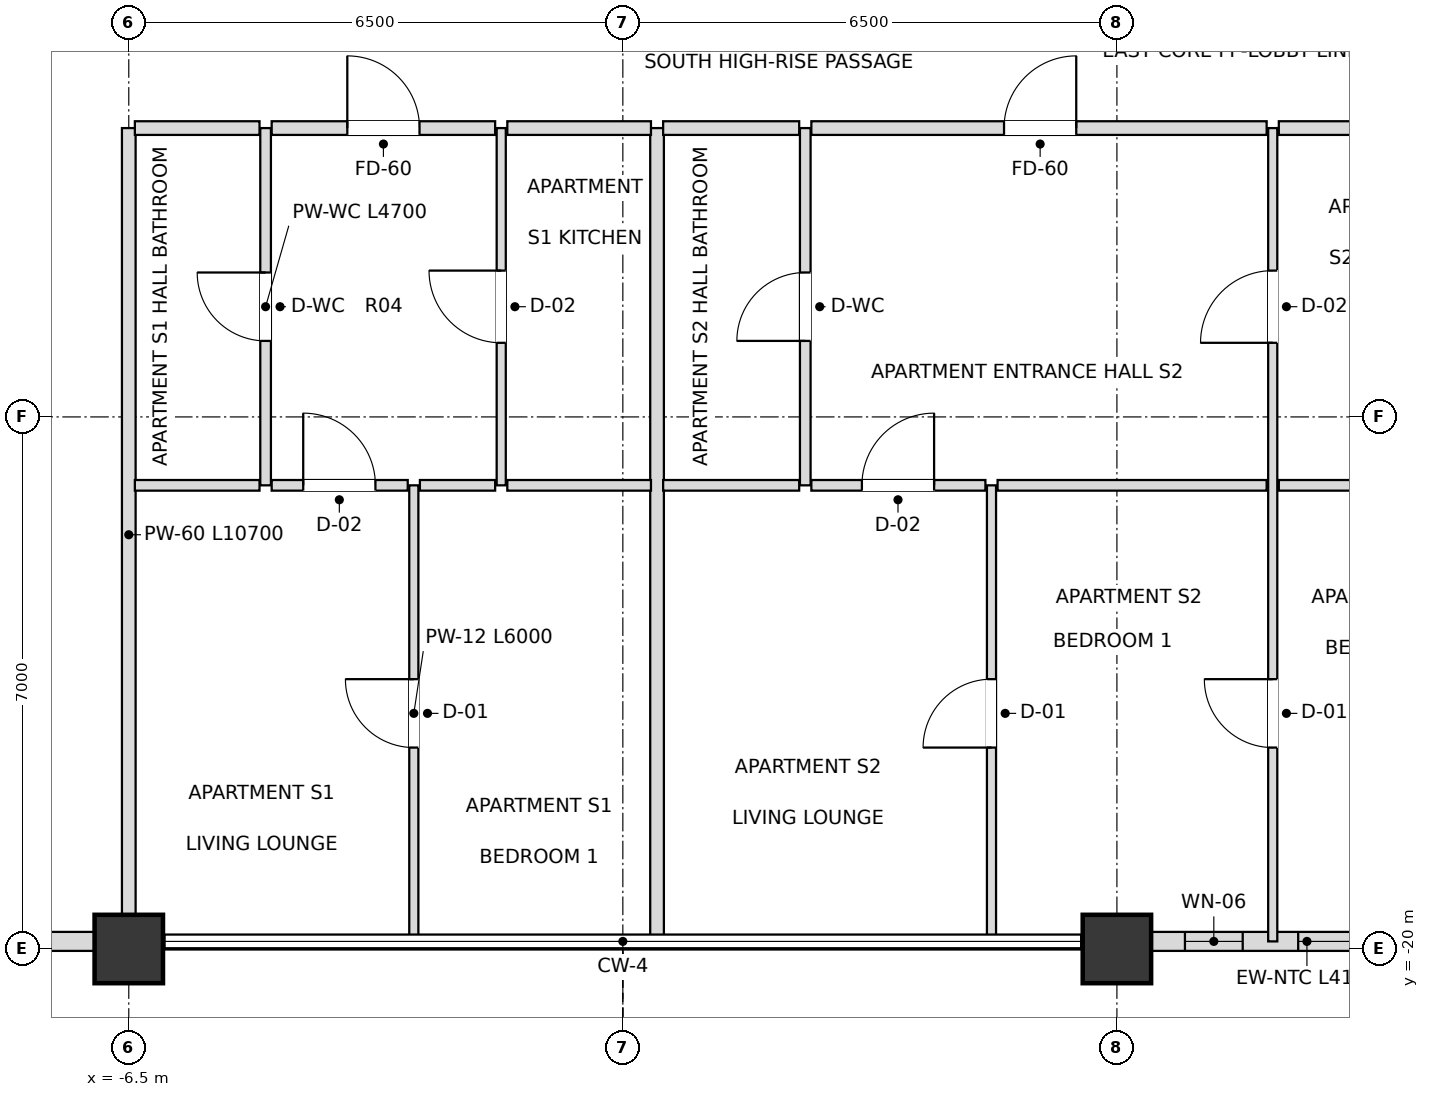
"""IFC4 building model, lengths in metres.
Left out: names, types, materials, properties, quantities, classifications, styles, units other than length and angle.
Written with IfcOpenShell. Run it as: python <this file> out.ifc"""

import sys

from ifc_helpers import new_model, si_unit, direction, frame, frame_2d, origin, origin_2d, place, context, subcontext, project, spatial, rectangle, extrude, element, fill, save


model = new_model("IFC4")
c1 = context("Model", 3, precision=1e-05, world=origin(), true_north=direction((0.0, 1.0)))
c2 = subcontext(c1, "Body", "Model", "MODEL_VIEW")
j1 = project(units=[si_unit("LENGTHUNIT", "METRE"), si_unit("PLANEANGLEUNIT", "RADIAN")], contexts=[c1])
p1 = place(None, origin())
s1 = spatial("IfcSite", under=j1, at=p1, CompositionType="ELEMENT")
p2 = place(p1, origin())
s2 = spatial("IfcBuilding", under=s1, at=p2, CompositionType="ELEMENT")
p3 = place(p2, frame((0.0, 0.0, 229.5)))
s3 = spatial("IfcBuildingStorey", under=s2, at=p3, CompositionType="ELEMENT", Elevation=229.5)
for number, where, z_axis, x_axis in (
    (1, (-6.5, -20.0, 0.0), (0.0, 0.0, 1.0), (1.0, 0.0, 0.0)),
    (2, (6.5, -20.0, 0.0), (0.0, 0.0, 1.0), (1.0, 0.0, 0.0)),
):
    element("IfcColumn", number, at=place(p3, frame(where, z_axis=z_axis, x_axis=x_axis)), inside=s3, PredefinedType="USERDEFINED", context=c2, shape_type="SweptSolid", body=[
        extrude(rectangle(XDim=0.9, YDim=0.9, at=origin_2d()), origin(), (0.0, 0.0, 1.0), 3.6),
    ])
p4 = place(p3, frame((-11.055, -19.9, 0.0), z_axis=(0.0, 0.0, 1.0), x_axis=(1.0, 0.0, 0.0)))
e3 = element("IfcWall", 3, at=p4, inside=s3, PredefinedType="SOLIDWALL", context=c2, shape_type="SweptSolid", body=[
    extrude(rectangle(XDim=4.11, YDim=0.25, at=frame_2d((2.055, 0.0))), origin(), (0.0, 0.0, 1.0), 2.748),
])
p5 = place(p4, frame((1.155, 0.0, 0.72)))
e4 = element("IfcOpeningElement", 4, at=p5, cuts=e3, PredefinedType="OPENING", context=c2, shape_type="SweptSolid", body=[
    extrude(rectangle(XDim=1.8, YDim=1.68, at=frame_2d((0.9, 0.84))), frame((0.0, 0.135, 0.0), z_axis=(0.0, -1.0, 0.0), x_axis=(1.0, 0.0, 0.0)), (0.0, 0.0, 1.0), 0.27),
])
p6 = place(p3, frame((6.945, -19.9, 0.0), z_axis=(0.0, 0.0, 1.0), x_axis=(1.0, 0.0, 0.0)))
e5 = element("IfcWall", 5, at=p6, inside=s3, PredefinedType="SOLIDWALL", context=c2, shape_type="SweptSolid", body=[
    extrude(rectangle(XDim=4.11, YDim=0.25, at=frame_2d((2.055, 0.0))), origin(), (0.0, 0.0, 1.0), 2.748),
])
p7 = place(p6, frame((0.45, 0.0, 0.72)))
e6 = element("IfcOpeningElement", 6, at=p7, cuts=e5, PredefinedType="OPENING", context=c2, shape_type="SweptSolid", body=[
    extrude(rectangle(XDim=0.76, YDim=1.68, at=frame_2d((0.38, 0.84))), frame((0.0, 0.135, 0.0), z_axis=(0.0, -1.0, 0.0), x_axis=(1.0, 0.0, 0.0)), (0.0, 0.0, 1.0), 0.27),
])
p8 = place(p6, frame((1.94, 0.0, 0.72)))
e7 = element("IfcOpeningElement", 7, at=p8, cuts=e5, PredefinedType="OPENING", context=c2, shape_type="SweptSolid", body=[
    extrude(rectangle(XDim=1.8, YDim=1.68, at=frame_2d((0.9, 0.84))), frame((0.0, 0.135, 0.0), z_axis=(0.0, -1.0, 0.0), x_axis=(1.0, 0.0, 0.0)), (0.0, 0.0, 1.0), 0.27),
])
p9 = place(p3, frame((-6.5, -19.9, 0.0), z_axis=(0.0, 0.0, 1.0), x_axis=(0.0, 1.0, 0.0)))
e8 = element("IfcWall", 8, at=p9, inside=s3, PredefinedType="PARTITIONING", context=c2, shape_type="SweptSolid", body=[
    extrude(rectangle(XDim=10.7, YDim=0.18, at=frame_2d((5.35, 0.0))), origin(), (0.0, 0.0, 1.0), 2.826),
])
p10 = place(p3, frame((-4.7, -13.9, 0.0), z_axis=(0.0, 0.0, 1.0), x_axis=(0.0, 1.0, 0.0)))
e9 = element("IfcWall", 9, at=p10, inside=s3, PredefinedType="PARTITIONING", context=c2, shape_type="SweptSolid", body=[
    extrude(rectangle(XDim=4.7, YDim=0.14, at=frame_2d((2.35, 0.0))), origin(), (0.0, 0.0, 1.0), 3.38),
])
p11 = place(p10, frame((1.9, 0.0, 0.0)))
e10 = element("IfcOpeningElement", 10, at=p11, cuts=e9, PredefinedType="OPENING", context=c2, shape_type="SweptSolid", body=[
    extrude(rectangle(XDim=0.9, YDim=2.1, at=frame_2d((0.45, 1.05))), frame((0.0, 0.08, 0.0), z_axis=(0.0, -1.0, 0.0), x_axis=(1.0, 0.0, 0.0)), (0.0, 0.0, 1.0), 0.16),
])
p12 = place(p3, frame((-2.75, -19.9, 0.0), z_axis=(0.0, 0.0, 1.0), x_axis=(0.0, 1.0, 0.0)))
e11 = element("IfcWall", 11, at=p12, inside=s3, PredefinedType="PARTITIONING", context=c2, shape_type="SweptSolid", body=[
    extrude(rectangle(XDim=6.0, YDim=0.12, at=frame_2d((3.0, 0.0))), origin(), (0.0, 0.0, 1.0), 3.018),
])
p13 = place(p12, frame((2.55, 0.0, 0.0)))
e12 = element("IfcOpeningElement", 12, at=p13, cuts=e11, PredefinedType="OPENING", context=c2, shape_type="SweptSolid", body=[
    extrude(rectangle(XDim=0.9, YDim=2.1, at=frame_2d((0.45, 1.05))), frame((0.0, 0.07, 0.0), z_axis=(0.0, -1.0, 0.0), x_axis=(1.0, 0.0, 0.0)), (0.0, 0.0, 1.0), 0.14),
])
p14 = place(p3, frame((-1.6, -13.9, 0.0), z_axis=(0.0, 0.0, 1.0), x_axis=(0.0, 1.0, 0.0)))
e13 = element("IfcWall", 13, at=p14, inside=s3, PredefinedType="PARTITIONING", context=c2, shape_type="SweptSolid", body=[
    extrude(rectangle(XDim=4.7, YDim=0.12, at=frame_2d((2.35, 0.0))), origin(), (0.0, 0.0, 1.0), 3.38),
])
p15 = place(p14, frame((1.875, 0.0, 0.0)))
e14 = element("IfcOpeningElement", 14, at=p15, cuts=e13, PredefinedType="OPENING", context=c2, shape_type="SweptSolid", body=[
    extrude(rectangle(XDim=0.95, YDim=2.1, at=frame_2d((0.475, 1.05))), frame((0.0, 0.07, 0.0), z_axis=(0.0, -1.0, 0.0), x_axis=(1.0, 0.0, 0.0)), (0.0, 0.0, 1.0), 0.14),
])
p16 = place(p3, frame((0.45, -19.9, 0.0), z_axis=(0.0, 0.0, 1.0), x_axis=(0.0, 1.0, 0.0)))
e15 = element("IfcWall", 15, at=p16, inside=s3, PredefinedType="PARTITIONING", context=c2, shape_type="SweptSolid", body=[
    extrude(rectangle(XDim=10.7, YDim=0.18, at=frame_2d((5.35, 0.0))), origin(), (0.0, 0.0, 1.0), 3.018),
])
p17 = place(p3, frame((2.4, -13.9, 0.0), z_axis=(0.0, 0.0, 1.0), x_axis=(0.0, 1.0, 0.0)))
e16 = element("IfcWall", 16, at=p17, inside=s3, PredefinedType="PARTITIONING", context=c2, shape_type="SweptSolid", body=[
    extrude(rectangle(XDim=4.7, YDim=0.14, at=frame_2d((2.35, 0.0))), origin(), (0.0, 0.0, 1.0), 3.38),
])
p18 = place(p17, frame((1.9, 0.0, 0.0)))
e17 = element("IfcOpeningElement", 17, at=p18, cuts=e16, PredefinedType="OPENING", context=c2, shape_type="SweptSolid", body=[
    extrude(rectangle(XDim=0.9, YDim=2.1, at=frame_2d((0.45, 1.05))), frame((0.0, 0.08, 0.0), z_axis=(0.0, -1.0, 0.0), x_axis=(1.0, 0.0, 0.0)), (0.0, 0.0, 1.0), 0.16),
])
p19 = place(p3, frame((4.85, -19.9, 0.0), z_axis=(0.0, 0.0, 1.0), x_axis=(0.0, 1.0, 0.0)))
e18 = element("IfcWall", 18, at=p19, inside=s3, PredefinedType="PARTITIONING", context=c2, shape_type="SweptSolid", body=[
    extrude(rectangle(XDim=6.0, YDim=0.12, at=frame_2d((3.0, 0.0))), origin(), (0.0, 0.0, 1.0), 3.018),
])
p20 = place(p19, frame((2.55, 0.0, 0.0)))
e19 = element("IfcOpeningElement", 19, at=p20, cuts=e18, PredefinedType="OPENING", context=c2, shape_type="SweptSolid", body=[
    extrude(rectangle(XDim=0.9, YDim=2.1, at=frame_2d((0.45, 1.05))), frame((0.0, 0.07, 0.0), z_axis=(0.0, -1.0, 0.0), x_axis=(1.0, 0.0, 0.0)), (0.0, 0.0, 1.0), 0.14),
])
p21 = place(p3, frame((8.55, -19.9, 0.0), z_axis=(0.0, 0.0, 1.0), x_axis=(0.0, 1.0, 0.0)))
e20 = element("IfcWall", 20, at=p21, inside=s3, PredefinedType="PARTITIONING", context=c2, shape_type="SweptSolid", body=[
    extrude(rectangle(XDim=10.7, YDim=0.12, at=frame_2d((5.35, 0.0))), origin(), (0.0, 0.0, 1.0), 2.826),
])
p22 = place(p21, frame((7.875, 0.0, 0.0)))
e21 = element("IfcOpeningElement", 21, at=p22, cuts=e20, PredefinedType="OPENING", context=c2, shape_type="SweptSolid", body=[
    extrude(rectangle(XDim=0.95, YDim=2.1, at=frame_2d((0.475, 1.05))), frame((0.0, 0.07, 0.0), z_axis=(0.0, -1.0, 0.0), x_axis=(1.0, 0.0, 0.0)), (0.0, 0.0, 1.0), 0.14),
])
p23 = place(p21, frame((2.55, 0.0, 0.0)))
e22 = element("IfcOpeningElement", 22, at=p23, cuts=e20, PredefinedType="OPENING", context=c2, shape_type="SweptSolid", body=[
    extrude(rectangle(XDim=0.9, YDim=2.1, at=frame_2d((0.45, 1.05))), frame((0.0, 0.07, 0.0), z_axis=(0.0, -1.0, 0.0), x_axis=(1.0, 0.0, 0.0)), (0.0, 0.0, 1.0), 0.14),
])
p24 = place(p3, frame((-6.42, -13.9, 0.0), z_axis=(0.0, 0.0, 1.0), x_axis=(1.0, 0.0, 0.0)))
e23 = element("IfcWall", 23, at=p24, inside=s3, PredefinedType="PARTITIONING", context=c2, shape_type="SweptSolid", body=[
    extrude(rectangle(XDim=1.64, YDim=0.14, at=frame_2d((0.82, 0.0))), origin(), (0.0, 0.0, 1.0), 3.38),
])
p25 = place(p3, frame((-4.62, -13.9, 0.0), z_axis=(0.0, 0.0, 1.0), x_axis=(1.0, 0.0, 0.0)))
e24 = element("IfcWall", 24, at=p25, inside=s3, PredefinedType="PARTITIONING", context=c2, shape_type="SweptSolid", body=[
    extrude(rectangle(XDim=1.79, YDim=0.14, at=frame_2d((0.895, 0.0))), origin(), (0.0, 0.0, 1.0), 3.38),
])
p26 = place(p25, frame((0.415, 0.0, 0.0)))
e25 = element("IfcOpeningElement", 25, at=p26, cuts=e24, PredefinedType="OPENING", context=c2, shape_type="SweptSolid", body=[
    extrude(rectangle(XDim=0.95, YDim=2.1, at=frame_2d((0.475, 1.05))), frame((0.0, 0.08, 0.0), z_axis=(0.0, -1.0, 0.0), x_axis=(1.0, 0.0, 0.0)), (0.0, 0.0, 1.0), 0.16),
])
p27 = place(p3, frame((-2.67, -13.9, 0.0), z_axis=(0.0, 0.0, 1.0), x_axis=(1.0, 0.0, 0.0)))
e26 = element("IfcWall", 26, at=p27, inside=s3, PredefinedType="PARTITIONING", context=c2, shape_type="SweptSolid", body=[
    extrude(rectangle(XDim=0.99, YDim=0.14, at=frame_2d((0.495, 0.0))), origin(), (0.0, 0.0, 1.0), 3.38),
])
p28 = place(p3, frame((-1.52, -13.9, 0.0), z_axis=(0.0, 0.0, 1.0), x_axis=(1.0, 0.0, 0.0)))
e27 = element("IfcWall", 27, at=p28, inside=s3, PredefinedType="PARTITIONING", context=c2, shape_type="SweptSolid", body=[
    extrude(rectangle(XDim=1.89, YDim=0.14, at=frame_2d((0.945, 0.0))), origin(), (0.0, 0.0, 1.0), 3.38),
])
p29 = place(p3, frame((0.53, -13.9, 0.0), z_axis=(0.0, 0.0, 1.0), x_axis=(1.0, 0.0, 0.0)))
e28 = element("IfcWall", 28, at=p29, inside=s3, PredefinedType="PARTITIONING", context=c2, shape_type="SweptSolid", body=[
    extrude(rectangle(XDim=1.79, YDim=0.14, at=frame_2d((0.895, 0.0))), origin(), (0.0, 0.0, 1.0), 3.38),
])
p30 = place(p3, frame((2.48, -13.9, 0.0), z_axis=(0.0, 0.0, 1.0), x_axis=(1.0, 0.0, 0.0)))
e29 = element("IfcWall", 29, at=p30, inside=s3, PredefinedType="PARTITIONING", context=c2, shape_type="SweptSolid", body=[
    extrude(rectangle(XDim=2.29, YDim=0.14, at=frame_2d((1.145, 0.0))), origin(), (0.0, 0.0, 1.0), 3.38),
])
p31 = place(p30, frame((0.665, 0.0, 0.0)))
e30 = element("IfcOpeningElement", 30, at=p31, cuts=e29, PredefinedType="OPENING", context=c2, shape_type="SweptSolid", body=[
    extrude(rectangle(XDim=0.95, YDim=2.1, at=frame_2d((0.475, 1.05))), frame((0.0, 0.08, 0.0), z_axis=(0.0, -1.0, 0.0), x_axis=(1.0, 0.0, 0.0)), (0.0, 0.0, 1.0), 0.16),
])
p32 = place(p3, frame((4.93, -13.9, 0.0), z_axis=(0.0, 0.0, 1.0), x_axis=(1.0, 0.0, 0.0)))
e31 = element("IfcWall", 31, at=p32, inside=s3, PredefinedType="PARTITIONING", context=c2, shape_type="SweptSolid", body=[
    extrude(rectangle(XDim=3.54, YDim=0.14, at=frame_2d((1.77, 0.0))), origin(), (0.0, 0.0, 1.0), 2.826),
])
p33 = place(p3, frame((8.63, -13.9, 0.0), z_axis=(0.0, 0.0, 1.0), x_axis=(1.0, 0.0, 0.0)))
e32 = element("IfcWall", 32, at=p33, inside=s3, PredefinedType="PARTITIONING", context=c2, shape_type="SweptSolid", body=[
    extrude(rectangle(XDim=2.69, YDim=0.14, at=frame_2d((1.345, 0.0))), origin(), (0.0, 0.0, 1.0), 3.38),
])
p34 = place(p3, frame((-6.42, -9.2, 0.0), z_axis=(0.0, 0.0, 1.0), x_axis=(1.0, 0.0, 0.0)))
e33 = element("IfcWall", 33, at=p34, inside=s3, PredefinedType="PARTITIONING", context=c2, shape_type="SweptSolid", body=[
    extrude(rectangle(XDim=1.64, YDim=0.18, at=frame_2d((0.82, 0.0))), origin(), (0.0, 0.0, 1.0), 3.38),
])
p35 = place(p3, frame((-4.62, -9.2, 0.0), z_axis=(0.0, 0.0, 1.0), x_axis=(1.0, 0.0, 0.0)))
e34 = element("IfcWall", 34, at=p35, inside=s3, PredefinedType="PARTITIONING", context=c2, shape_type="SweptSolid", body=[
    extrude(rectangle(XDim=2.94, YDim=0.18, at=frame_2d((1.47, 0.0))), origin(), (0.0, 0.0, 1.0), 3.38),
])
p36 = place(p35, frame((0.995, 0.0, 0.0)))
e35 = element("IfcOpeningElement", 35, at=p36, cuts=e34, PredefinedType="OPENING", context=c2, shape_type="SweptSolid", body=[
    extrude(rectangle(XDim=0.95, YDim=2.15, at=frame_2d((0.475, 1.075))), frame((0.0, 0.1, 0.0), z_axis=(0.0, -1.0, 0.0), x_axis=(1.0, 0.0, 0.0)), (0.0, 0.0, 1.0), 0.2),
])
p37 = place(p3, frame((-1.52, -9.2, 0.0), z_axis=(0.0, 0.0, 1.0), x_axis=(1.0, 0.0, 0.0)))
e36 = element("IfcWall", 36, at=p37, inside=s3, PredefinedType="PARTITIONING", context=c2, shape_type="SweptSolid", body=[
    extrude(rectangle(XDim=1.89, YDim=0.18, at=frame_2d((0.945, 0.0))), origin(), (0.0, 0.0, 1.0), 3.38),
])
p38 = place(p3, frame((0.53, -9.2, 0.0), z_axis=(0.0, 0.0, 1.0), x_axis=(1.0, 0.0, 0.0)))
e37 = element("IfcWall", 37, at=p38, inside=s3, PredefinedType="PARTITIONING", context=c2, shape_type="SweptSolid", body=[
    extrude(rectangle(XDim=1.79, YDim=0.18, at=frame_2d((0.895, 0.0))), origin(), (0.0, 0.0, 1.0), 3.38),
])
p39 = place(p3, frame((2.48, -9.2, 0.0), z_axis=(0.0, 0.0, 1.0), x_axis=(1.0, 0.0, 0.0)))
e38 = element("IfcWall", 38, at=p39, inside=s3, PredefinedType="PARTITIONING", context=c2, shape_type="SweptSolid", body=[
    extrude(rectangle(XDim=5.99, YDim=0.18, at=frame_2d((2.995, 0.0))), origin(), (0.0, 0.0, 1.0), 2.826),
])
p40 = place(p39, frame((2.535, 0.0, 0.0)))
e39 = element("IfcOpeningElement", 39, at=p40, cuts=e38, PredefinedType="OPENING", context=c2, shape_type="SweptSolid", body=[
    extrude(rectangle(XDim=0.95, YDim=2.15, at=frame_2d((0.475, 1.075))), frame((0.0, 0.1, 0.0), z_axis=(0.0, -1.0, 0.0), x_axis=(1.0, 0.0, 0.0)), (0.0, 0.0, 1.0), 0.2),
])
p41 = place(p3, frame((8.63, -9.2, 0.0), z_axis=(0.0, 0.0, 1.0), x_axis=(1.0, 0.0, 0.0)))
e40 = element("IfcWall", 40, at=p41, inside=s3, PredefinedType="PARTITIONING", context=c2, shape_type="SweptSolid", body=[
    extrude(rectangle(XDim=2.69, YDim=0.18, at=frame_2d((1.345, 0.0))), origin(), (0.0, 0.0, 1.0), 3.38),
])
p42 = place(p7, origin())
e41 = element("IfcWindow", 41, at=p42, inside=s3, PartitioningType="SINGLE_PANEL", PredefinedType="WINDOW", context=c2, shape_type="SweptSolid", body=[
    extrude(rectangle(XDim=0.76, YDim=1.68, at=frame_2d((0.38, 0.84))), frame((0.0, 0.03, 0.0), z_axis=(0.0, -1.0, 0.0), x_axis=(1.0, 0.0, 0.0)), (0.0, 0.0, 1.0), 0.06),
])
fill(e6, e41)
p43 = place(p8, origin())
e42 = element("IfcWindow", 42, at=p43, inside=s3, PartitioningType="SINGLE_PANEL", PredefinedType="WINDOW", context=c2, shape_type="SweptSolid", body=[
    extrude(rectangle(XDim=1.8, YDim=1.68, at=frame_2d((0.9, 0.84))), frame((0.0, 0.03, 0.0), z_axis=(0.0, -1.0, 0.0), x_axis=(1.0, 0.0, 0.0)), (0.0, 0.0, 1.0), 0.06),
])
fill(e7, e42)
p44 = place(p11, origin())
e43 = element("IfcDoor", 43, at=p44, inside=s3, OperationType="SINGLE_SWING_RIGHT", PredefinedType="DOOR", context=c2, shape_type="SweptSolid", body=[
    extrude(rectangle(XDim=0.9, YDim=2.1, at=frame_2d((0.45, 1.05))), frame((0.0, 0.025, 0.0), z_axis=(0.0, -1.0, 0.0), x_axis=(1.0, 0.0, 0.0)), (0.0, 0.0, 1.0), 0.05),
])
fill(e10, e43)
p45 = place(p36, origin())
e44 = element("IfcDoor", 44, at=p45, inside=s3, OperationType="SINGLE_SWING_LEFT", PredefinedType="DOOR", context=c2, shape_type="SweptSolid", body=[
    extrude(rectangle(XDim=0.95, YDim=2.15, at=frame_2d((0.475, 1.075))), frame((0.0, 0.025, 0.0), z_axis=(0.0, -1.0, 0.0), x_axis=(1.0, 0.0, 0.0)), (0.0, 0.0, 1.0), 0.05),
])
fill(e35, e44)
p46 = place(p15, origin())
e45 = element("IfcDoor", 45, at=p46, inside=s3, OperationType="SINGLE_SWING_RIGHT", PredefinedType="DOOR", context=c2, shape_type="SweptSolid", body=[
    extrude(rectangle(XDim=0.95, YDim=2.1, at=frame_2d((0.475, 1.05))), frame((0.0, 0.025, 0.0), z_axis=(0.0, -1.0, 0.0), x_axis=(1.0, 0.0, 0.0)), (0.0, 0.0, 1.0), 0.05),
])
fill(e14, e45)
p47 = place(p26, origin())
e46 = element("IfcDoor", 46, at=p47, inside=s3, OperationType="SINGLE_SWING_LEFT", PredefinedType="DOOR", context=c2, shape_type="SweptSolid", body=[
    extrude(rectangle(XDim=0.95, YDim=2.1, at=frame_2d((0.475, 1.05))), frame((0.0, 0.025, 0.0), z_axis=(0.0, -1.0, 0.0), x_axis=(1.0, 0.0, 0.0)), (0.0, 0.0, 1.0), 0.05),
])
fill(e25, e46)
p48 = place(p13, origin())
e47 = element("IfcDoor", 47, at=p48, inside=s3, OperationType="SINGLE_SWING_RIGHT", PredefinedType="DOOR", context=c2, shape_type="SweptSolid", body=[
    extrude(rectangle(XDim=0.9, YDim=2.1, at=frame_2d((0.45, 1.05))), frame((0.0, 0.025, 0.0), z_axis=(0.0, -1.0, 0.0), x_axis=(1.0, 0.0, 0.0)), (0.0, 0.0, 1.0), 0.05),
])
fill(e12, e47)
p49 = place(p18, origin())
e48 = element("IfcDoor", 48, at=p49, inside=s3, OperationType="SINGLE_SWING_LEFT", PredefinedType="DOOR", context=c2, shape_type="SweptSolid", body=[
    extrude(rectangle(XDim=0.9, YDim=2.1, at=frame_2d((0.45, 1.05))), frame((0.0, 0.025, 0.0), z_axis=(0.0, -1.0, 0.0), x_axis=(1.0, 0.0, 0.0)), (0.0, 0.0, 1.0), 0.05),
])
fill(e17, e48)
p50 = place(p40, origin())
e49 = element("IfcDoor", 49, at=p50, inside=s3, OperationType="SINGLE_SWING_RIGHT", PredefinedType="DOOR", context=c2, shape_type="SweptSolid", body=[
    extrude(rectangle(XDim=0.95, YDim=2.15, at=frame_2d((0.475, 1.075))), frame((0.0, 0.025, 0.0), z_axis=(0.0, -1.0, 0.0), x_axis=(1.0, 0.0, 0.0)), (0.0, 0.0, 1.0), 0.05),
])
fill(e39, e49)
p51 = place(p22, origin())
e50 = element("IfcDoor", 50, at=p51, inside=s3, OperationType="SINGLE_SWING_LEFT", PredefinedType="DOOR", context=c2, shape_type="SweptSolid", body=[
    extrude(rectangle(XDim=0.95, YDim=2.1, at=frame_2d((0.475, 1.05))), frame((0.0, 0.025, 0.0), z_axis=(0.0, -1.0, 0.0), x_axis=(1.0, 0.0, 0.0)), (0.0, 0.0, 1.0), 0.05),
])
fill(e21, e50)
p52 = place(p31, origin())
e51 = element("IfcDoor", 51, at=p52, inside=s3, OperationType="SINGLE_SWING_RIGHT", PredefinedType="DOOR", context=c2, shape_type="SweptSolid", body=[
    extrude(rectangle(XDim=0.95, YDim=2.1, at=frame_2d((0.475, 1.05))), frame((0.0, 0.025, 0.0), z_axis=(0.0, -1.0, 0.0), x_axis=(1.0, 0.0, 0.0)), (0.0, 0.0, 1.0), 0.05),
])
fill(e30, e51)
p53 = place(p20, origin())
e52 = element("IfcDoor", 52, at=p53, inside=s3, OperationType="SINGLE_SWING_LEFT", PredefinedType="DOOR", context=c2, shape_type="SweptSolid", body=[
    extrude(rectangle(XDim=0.9, YDim=2.1, at=frame_2d((0.45, 1.05))), frame((0.0, 0.025, 0.0), z_axis=(0.0, -1.0, 0.0), x_axis=(1.0, 0.0, 0.0)), (0.0, 0.0, 1.0), 0.05),
])
fill(e19, e52)
p54 = place(p23, origin())
e53 = element("IfcDoor", 53, at=p54, inside=s3, OperationType="SINGLE_SWING_RIGHT", PredefinedType="DOOR", context=c2, shape_type="SweptSolid", body=[
    extrude(rectangle(XDim=0.9, YDim=2.1, at=frame_2d((0.45, 1.05))), frame((0.0, 0.025, 0.0), z_axis=(0.0, -1.0, 0.0), x_axis=(1.0, 0.0, 0.0)), (0.0, 0.0, 1.0), 0.05),
])
fill(e22, e53)
save(model, sys.argv[1])
